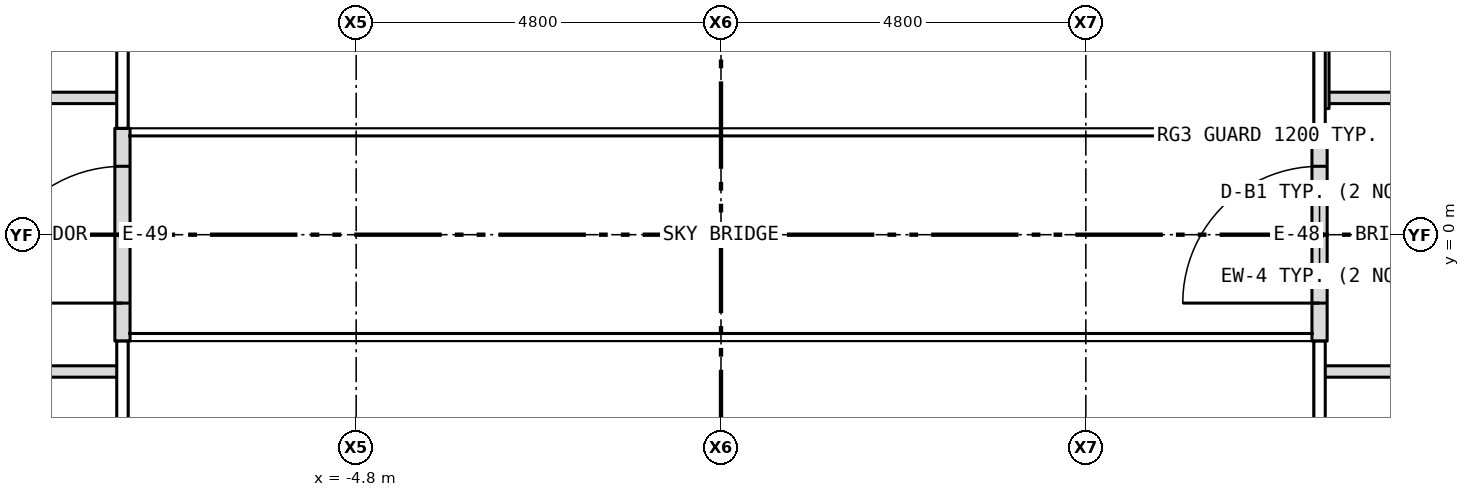
"""IFC4 building model, lengths in metres.
Left out: names, types, materials, properties, quantities, classifications, styles, units other than length and angle.
Written with IfcOpenShell. Run it as: python <this file> out.ifc"""

import sys

from ifc_helpers import new_model, si_unit, direction, frame, frame_2d, origin, place, context, subcontext, project, spatial, rectangle, extrude, element, fill, save


model = new_model("IFC4")
c1 = context("Model", 3, precision=1e-05, world=origin(), true_north=direction((0.0, 1.0)))
c2 = subcontext(c1, "Body", "Model", "MODEL_VIEW")
j1 = project(units=[si_unit("LENGTHUNIT", "METRE"), si_unit("PLANEANGLEUNIT", "RADIAN")], contexts=[c1])
p1 = place(None, origin())
s1 = spatial("IfcSite", under=j1, at=p1, CompositionType="ELEMENT")
p2 = place(p1, origin())
s2 = spatial("IfcBuilding", under=s1, at=p2, CompositionType="ELEMENT")
p3 = place(p2, frame((0.0, 0.0, 124.0)))
s3 = spatial("IfcBuildingStorey", under=s2, at=p3, CompositionType="ELEMENT", Elevation=124.0)
p4 = place(p3, frame((7.875, -1.4, 0.0), z_axis=(0.0, 0.0, 1.0), x_axis=(0.0, 1.0, 0.0)))
e1 = element("IfcWall", 1, at=p4, inside=s3, PredefinedType="SOLIDWALL", context=c2, shape_type="SweptSolid", body=[
    extrude(rectangle(XDim=2.8, YDim=0.2, at=frame_2d((1.4, 0.0))), origin(), (0.0, 0.0, 1.0), 3.5),
])
p5 = place(p4, frame((0.5, 0.0, 0.0)))
e2 = element("IfcOpeningElement", 2, at=p5, cuts=e1, PredefinedType="OPENING", context=c2, shape_type="SweptSolid", body=[
    extrude(rectangle(XDim=1.8, YDim=2.1, at=frame_2d((0.9, 1.05))), frame((0.0, 0.112, 0.0), z_axis=(0.0, -1.0, 0.0), x_axis=(1.0, 0.0, 0.0)), (0.0, 0.0, 1.0), 0.224),
])
p6 = place(p3, frame((-7.875, -1.4, 0.0), z_axis=(0.0, 0.0, 1.0), x_axis=(0.0, 1.0, 0.0)))
e3 = element("IfcWall", 3, at=p6, inside=s3, PredefinedType="SOLIDWALL", context=c2, shape_type="SweptSolid", body=[
    extrude(rectangle(XDim=2.8, YDim=0.2, at=frame_2d((1.4, 0.0))), origin(), (0.0, 0.0, 1.0), 3.5),
])
p7 = place(p6, frame((0.5, 0.0, 0.0)))
e4 = element("IfcOpeningElement", 4, at=p7, cuts=e3, PredefinedType="OPENING", context=c2, shape_type="SweptSolid", body=[
    extrude(rectangle(XDim=1.8, YDim=2.1, at=frame_2d((0.9, 1.05))), frame((0.0, 0.112, 0.0), z_axis=(0.0, -1.0, 0.0), x_axis=(1.0, 0.0, 0.0)), (0.0, 0.0, 1.0), 0.224),
])
for number, where, z_axis, x_axis in (
    (5, (-12.4, -1.8, 0.0), (0.0, 0.0, 1.0), (1.0, 0.0, 0.0)),
    (6, (7.92, -1.8, 0.0), (0.0, 0.0, 1.0), (1.0, 0.0, 0.0)),
    (7, (-12.4, 1.8, 0.0), (0.0, 0.0, 1.0), (1.0, 0.0, 0.0)),
):
    element("IfcWall", number, at=place(p3, frame(where, z_axis=z_axis, x_axis=x_axis)), inside=s3, PredefinedType="PARTITIONING", context=c2, shape_type="SweptSolid", body=[
        extrude(rectangle(XDim=4.48, YDim=0.15, at=frame_2d((2.24, 0.0))), origin(), (0.0, 0.0, 1.0), 3.35),
    ])
p8 = place(p3, frame((7.95, 1.8, 0.0), z_axis=(0.0, 0.0, 1.0), x_axis=(1.0, 0.0, 0.0)))
e8 = element("IfcWall", 8, at=p8, inside=s3, PredefinedType="PARTITIONING", context=c2, shape_type="SweptSolid", body=[
    extrude(rectangle(XDim=4.45, YDim=0.15, at=frame_2d((2.225, 0.0))), origin(), (0.0, 0.0, 1.0), 3.35),
])
p9 = place(p3, frame((7.95, 1.66, 0.0), z_axis=(0.0, 0.0, 1.0), x_axis=(0.0, 1.0, 0.0)))
e9 = element("IfcWall", 9, at=p9, inside=s3, PredefinedType="PARTITIONING", context=c2, shape_type="SweptSolid", body=[
    extrude(rectangle(XDim=4.38, YDim=0.1, at=frame_2d((2.19, 0.0))), origin(), (0.0, 0.0, 1.0), 2.733),
])
p10 = place(p5, origin())
e10 = element("IfcDoor", 10, at=p10, inside=s3, OperationType="DOUBLE_DOOR_DOUBLE_SWING", PredefinedType="DOOR", context=c2, shape_type="SweptSolid", body=[
    extrude(rectangle(XDim=1.8, YDim=2.1, at=frame_2d((0.9, 1.05))), frame((0.0, 0.025, 0.0), z_axis=(0.0, -1.0, 0.0), x_axis=(1.0, 0.0, 0.0)), (0.0, 0.0, 1.0), 0.05),
])
fill(e2, e10)
p11 = place(p7, origin())
e11 = element("IfcDoor", 11, at=p11, inside=s3, OperationType="DOUBLE_DOOR_DOUBLE_SWING", PredefinedType="DOOR", context=c2, shape_type="SweptSolid", body=[
    extrude(rectangle(XDim=1.8, YDim=2.1, at=frame_2d((0.9, 1.05))), frame((0.0, 0.025, 0.0), z_axis=(0.0, -1.0, 0.0), x_axis=(1.0, 0.0, 0.0)), (0.0, 0.0, 1.0), 0.05),
])
fill(e4, e11)
save(model, sys.argv[1])
